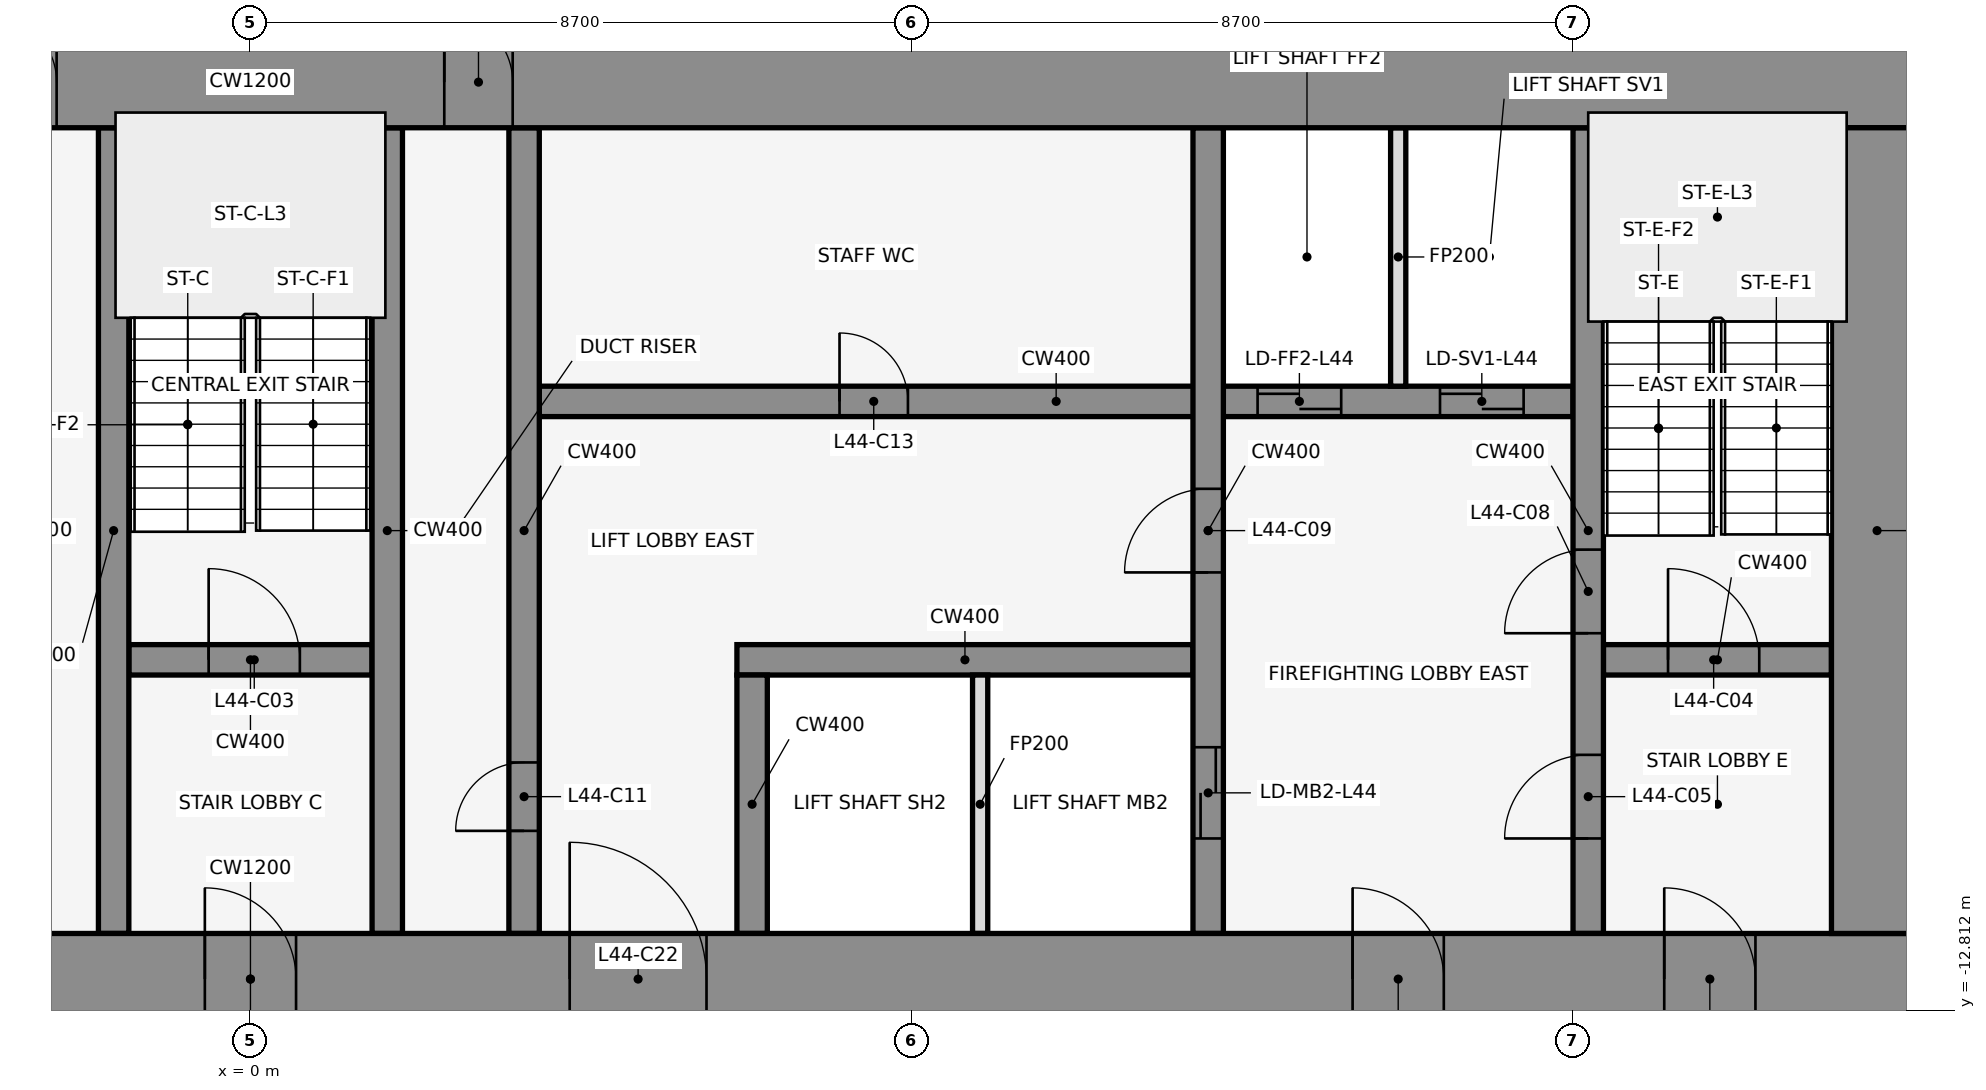
"""IFC4 building model, lengths in metres.
Left out: names, types, materials, properties, quantities, classifications, styles, units other than length and angle.
Written with IfcOpenShell. Run it as: python <this file> out.ifc"""

import sys

from ifc_helpers import new_model, si_unit, direction, frame, frame_2d, origin, place, context, subcontext, project, spatial, rectangle, extrude, element, fill, save


model = new_model("IFC4")
c1 = context("Model", 3, precision=1e-05, world=origin(), true_north=direction((0.0, 1.0)))
c2 = subcontext(c1, "Body", "Model", "MODEL_VIEW")
j1 = project(units=[si_unit("LENGTHUNIT", "METRE"), si_unit("PLANEANGLEUNIT", "RADIAN")], contexts=[c1])
p1 = place(None, origin())
s1 = spatial("IfcSite", under=j1, at=p1, CompositionType="ELEMENT")
p2 = place(p1, origin())
s2 = spatial("IfcBuilding", under=s1, at=p2, CompositionType="ELEMENT")
p3 = place(p2, frame((0.0, 0.0, 199.1)))
s3 = spatial("IfcBuildingStorey", under=s2, at=p3, CompositionType="ELEMENT", Elevation=199.1)
for number, where, z_axis, x_axis in (
    (1, (16.432, -0.105, 0.0), (0.0, 0.0, 1.0), (-0.84, 0.543, 0.0)),
    (2, (1.901, 1.08, 0.0), (0.0, 0.0, 1.0), (-0.84, -0.543, 0.0)),
    (3, (-0.068, -0.105, 0.0), (0.0, 0.0, 1.0), (-0.84, 0.543, 0.0)),
):
    element("IfcWall", number, at=place(p3, frame(where, z_axis=z_axis, x_axis=x_axis)), inside=s3, PredefinedType="STANDARD", context=c2, shape_type="SweptSolid", body=[
        extrude(rectangle(XDim=2.183, YDim=0.25, at=frame_2d((1.091, 0.0))), origin(), (0.0, 0.0, 1.0), 3.95),
    ])
p4 = place(p3, frame((-1.6, -8.2, 0.0), z_axis=(0.0, 0.0, 1.0), x_axis=(1.0, 0.0, 0.0)))
e4 = element("IfcWall", 4, at=p4, inside=s3, PredefinedType="SHEAR", context=c2, shape_type="SweptSolid", body=[
    extrude(rectangle(XDim=3.2, YDim=0.4, at=frame_2d((1.6, 0.0))), origin(), (0.0, 0.0, 1.0), 4.1),
])
p5 = place(p4, frame((1.05, 0.0, 0.0)))
e5 = element("IfcOpeningElement", 5, at=p5, cuts=e4, PredefinedType="OPENING", context=c2, shape_type="SweptSolid", body=[
    extrude(rectangle(XDim=1.2, YDim=2.1, at=frame_2d((0.6, 1.05))), frame((0.0, 0.212, 0.0), z_axis=(0.0, -1.0, 0.0), x_axis=(1.0, 0.0, 0.0)), (0.0, 0.0, 1.0), 0.424),
])
p6 = place(p3, frame((6.4, -8.2, 0.0), z_axis=(0.0, 0.0, 1.0), x_axis=(1.0, 0.0, 0.0)))
e6 = element("IfcWall", 6, at=p6, inside=s3, PredefinedType="SHEAR", context=c2, shape_type="SweptSolid", body=[
    extrude(rectangle(XDim=6.0, YDim=0.4, at=frame_2d((3.0, 0.0))), origin(), (0.0, 0.0, 1.0), 4.1),
])
p7 = place(p3, frame((17.8, -8.2, 0.0), z_axis=(0.0, 0.0, 1.0), x_axis=(1.0, 0.0, 0.0)))
e7 = element("IfcWall", 7, at=p7, inside=s3, PredefinedType="SHEAR", context=c2, shape_type="SweptSolid", body=[
    extrude(rectangle(XDim=3.0, YDim=0.4, at=frame_2d((1.5, 0.0))), origin(), (0.0, 0.0, 1.0), 4.1),
])
p8 = place(p7, frame((0.85, 0.0, 0.0)))
e8 = element("IfcOpeningElement", 8, at=p8, cuts=e7, PredefinedType="OPENING", context=c2, shape_type="SweptSolid", body=[
    extrude(rectangle(XDim=1.2, YDim=2.1, at=frame_2d((0.6, 1.05))), frame((0.0, 0.212, 0.0), z_axis=(0.0, -1.0, 0.0), x_axis=(1.0, 0.0, 0.0)), (0.0, 0.0, 1.0), 0.424),
])
p9 = place(p3, frame((3.8, -4.8, 0.0), z_axis=(0.0, 0.0, 1.0), x_axis=(1.0, 0.0, 0.0)))
e9 = element("IfcWall", 9, at=p9, inside=s3, PredefinedType="SHEAR", context=c2, shape_type="SweptSolid", body=[
    extrude(rectangle(XDim=13.6, YDim=0.4, at=frame_2d((6.8, 0.0))), origin(), (0.0, 0.0, 1.0), 4.1),
])
p10 = place(p9, frame((9.45, 0.0, 0.0)))
e10 = element("IfcOpeningElement", 10, at=p10, cuts=e9, PredefinedType="OPENING", context=c2, shape_type="SweptSolid", body=[
    extrude(rectangle(XDim=1.1, YDim=2.1, at=frame_2d((0.55, 1.05))), frame((0.0, 0.212, 0.0), z_axis=(0.0, -1.0, 0.0), x_axis=(1.0, 0.0, 0.0)), (0.0, 0.0, 1.0), 0.424),
])
p11 = place(p9, frame((11.85, 0.0, 0.0)))
e11 = element("IfcOpeningElement", 11, at=p11, cuts=e9, PredefinedType="OPENING", context=c2, shape_type="SweptSolid", body=[
    extrude(rectangle(XDim=1.1, YDim=2.1, at=frame_2d((0.55, 1.05))), frame((0.0, 0.212, 0.0), z_axis=(0.0, -1.0, 0.0), x_axis=(1.0, 0.0, 0.0)), (0.0, 0.0, 1.0), 0.424),
])
p12 = place(p9, frame((3.95, 0.0, 0.0)))
e12 = element("IfcOpeningElement", 12, at=p12, cuts=e9, PredefinedType="OPENING", context=c2, shape_type="SweptSolid", body=[
    extrude(rectangle(XDim=0.9, YDim=2.1, at=frame_2d((0.45, 1.05))), frame((0.0, 0.212, 0.0), z_axis=(0.0, -1.0, 0.0), x_axis=(1.0, 0.0, 0.0)), (0.0, 0.0, 1.0), 0.424),
])
for number, where, z_axis, x_axis in (
    (13, (-1.8, -11.8, 0.0), (0.0, 0.0, 1.0), (0.0, 1.0, 0.0)),
    (14, (1.8, -11.8, 0.0), (0.0, 0.0, 1.0), (0.0, 1.0, 0.0)),
):
    element("IfcWall", number, at=place(p3, frame(where, z_axis=z_axis, x_axis=x_axis)), inside=s3, PredefinedType="SHEAR", context=c2, shape_type="SweptSolid", body=[
        extrude(rectangle(XDim=10.6, YDim=0.4, at=frame_2d((5.3, 0.0))), origin(), (0.0, 0.0, 1.0), 4.1),
    ])
p13 = place(p3, frame((3.6, -11.8, 0.0), z_axis=(0.0, 0.0, 1.0), x_axis=(0.0, 1.0, 0.0)))
e15 = element("IfcWall", 15, at=p13, inside=s3, PredefinedType="SHEAR", context=c2, shape_type="SweptSolid", body=[
    extrude(rectangle(XDim=10.6, YDim=0.4, at=frame_2d((5.3, 0.0))), origin(), (0.0, 0.0, 1.0), 4.1),
])
p14 = place(p13, frame((1.35, 0.0, 0.0)))
e16 = element("IfcOpeningElement", 16, at=p14, cuts=e15, PredefinedType="OPENING", context=c2, shape_type="SweptSolid", body=[
    extrude(rectangle(XDim=0.9, YDim=2.1, at=frame_2d((0.45, 1.05))), frame((0.0, 0.212, 0.0), z_axis=(0.0, -1.0, 0.0), x_axis=(1.0, 0.0, 0.0)), (0.0, 0.0, 1.0), 0.424),
])
p15 = place(p3, frame((6.6, -11.8, 0.0), z_axis=(0.0, 0.0, 1.0), x_axis=(0.0, 1.0, 0.0)))
e17 = element("IfcWall", 17, at=p15, inside=s3, PredefinedType="SHEAR", context=c2, shape_type="SweptSolid", body=[
    extrude(rectangle(XDim=3.4, YDim=0.4, at=frame_2d((1.7, 0.0))), origin(), (0.0, 0.0, 1.0), 4.1),
])
p16 = place(p3, frame((9.6, -11.8, 0.0), z_axis=(0.0, 0.0, 1.0), x_axis=(0.0, 1.0, 0.0)))
e18 = element("IfcWall", 18, at=p16, inside=s3, PredefinedType="PARTITIONING", context=c2, shape_type="SweptSolid", body=[
    extrude(rectangle(XDim=3.4, YDim=0.2, at=frame_2d((1.7, 0.0))), origin(), (0.0, 0.0, 1.0), 2.84),
])
p17 = place(p3, frame((12.6, -11.8, 0.0), z_axis=(0.0, 0.0, 1.0), x_axis=(0.0, 1.0, 0.0)))
e19 = element("IfcWall", 19, at=p17, inside=s3, PredefinedType="SHEAR", context=c2, shape_type="SweptSolid", body=[
    extrude(rectangle(XDim=10.6, YDim=0.4, at=frame_2d((5.3, 0.0))), origin(), (0.0, 0.0, 1.0), 4.1),
])
p18 = place(p17, frame((1.25, 0.0, 0.0)))
e20 = element("IfcOpeningElement", 20, at=p18, cuts=e19, PredefinedType="OPENING", context=c2, shape_type="SweptSolid", body=[
    extrude(rectangle(XDim=1.2, YDim=2.1, at=frame_2d((0.6, 1.05))), frame((0.0, 0.212, 0.0), z_axis=(0.0, -1.0, 0.0), x_axis=(1.0, 0.0, 0.0)), (0.0, 0.0, 1.0), 0.424),
])
p19 = place(p17, frame((4.75, 0.0, 0.0)))
e21 = element("IfcOpeningElement", 21, at=p19, cuts=e19, PredefinedType="OPENING", context=c2, shape_type="SweptSolid", body=[
    extrude(rectangle(XDim=1.1, YDim=2.1, at=frame_2d((0.55, 1.05))), frame((0.0, 0.212, 0.0), z_axis=(0.0, -1.0, 0.0), x_axis=(1.0, 0.0, 0.0)), (0.0, 0.0, 1.0), 0.424),
])
p20 = place(p3, frame((15.1, -4.6, 0.0), z_axis=(0.0, 0.0, 1.0), x_axis=(0.0, 1.0, 0.0)))
e22 = element("IfcWall", 22, at=p20, inside=s3, PredefinedType="PARTITIONING", context=c2, shape_type="SweptSolid", body=[
    extrude(rectangle(XDim=3.4, YDim=0.2, at=frame_2d((1.7, 0.0))), origin(), (0.0, 0.0, 1.0), 2.84),
])
p21 = place(p3, frame((17.6, -11.8, 0.0), z_axis=(0.0, 0.0, 1.0), x_axis=(0.0, 1.0, 0.0)))
e23 = element("IfcWall", 23, at=p21, inside=s3, PredefinedType="SHEAR", context=c2, shape_type="SweptSolid", body=[
    extrude(rectangle(XDim=10.6, YDim=0.4, at=frame_2d((5.3, 0.0))), origin(), (0.0, 0.0, 1.0), 4.1),
])
p22 = place(p21, frame((1.25, 0.0, 0.0)))
e24 = element("IfcOpeningElement", 24, at=p22, cuts=e23, PredefinedType="OPENING", context=c2, shape_type="SweptSolid", body=[
    extrude(rectangle(XDim=1.1, YDim=2.1, at=frame_2d((0.55, 1.05))), frame((0.0, 0.212, 0.0), z_axis=(0.0, -1.0, 0.0), x_axis=(1.0, 0.0, 0.0)), (0.0, 0.0, 1.0), 0.424),
])
p23 = place(p21, frame((3.95, 0.0, 0.0)))
e25 = element("IfcOpeningElement", 25, at=p23, cuts=e23, PredefinedType="OPENING", context=c2, shape_type="SweptSolid", body=[
    extrude(rectangle(XDim=1.1, YDim=2.1, at=frame_2d((0.55, 1.05))), frame((0.0, 0.212, 0.0), z_axis=(0.0, -1.0, 0.0), x_axis=(1.0, 0.0, 0.0)), (0.0, 0.0, 1.0), 0.424),
])
p24 = place(p3, frame((-22.0, -0.6, 0.0), z_axis=(0.0, 0.0, 1.0), x_axis=(1.0, 0.0, 0.0)))
e26 = element("IfcWall", 26, at=p24, inside=s3, PredefinedType="SHEAR", context=c2, shape_type="SweptSolid", body=[
    extrude(rectangle(XDim=44.0, YDim=1.2, at=frame_2d((22.0, 0.0))), origin(), (0.0, 0.0, 1.0), 4.1),
])
p25 = place(p24, frame((18.55, 0.0, 0.0)))
e27 = element("IfcOpeningElement", 27, at=p25, cuts=e26, PredefinedType="OPENING", context=c2, shape_type="SweptSolid", body=[
    extrude(rectangle(XDim=0.9, YDim=2.1, at=frame_2d((0.45, 1.05))), frame((0.0, 0.612, 0.0), z_axis=(0.0, -1.0, 0.0), x_axis=(1.0, 0.0, 0.0)), (0.0, 0.0, 1.0), 1.224),
])
p26 = place(p24, frame((24.55, 0.0, 0.0)))
e28 = element("IfcOpeningElement", 28, at=p26, cuts=e26, PredefinedType="OPENING", context=c2, shape_type="SweptSolid", body=[
    extrude(rectangle(XDim=0.9, YDim=2.1, at=frame_2d((0.45, 1.05))), frame((0.0, 0.612, 0.0), z_axis=(0.0, -1.0, 0.0), x_axis=(1.0, 0.0, 0.0)), (0.0, 0.0, 1.0), 1.224),
])
p27 = place(p3, frame((-22.0, -12.4, 0.0), z_axis=(0.0, 0.0, 1.0), x_axis=(1.0, 0.0, 0.0)))
e29 = element("IfcWall", 29, at=p27, inside=s3, PredefinedType="SHEAR", context=c2, shape_type="SweptSolid", body=[
    extrude(rectangle(XDim=44.0, YDim=1.2, at=frame_2d((22.0, 0.0))), origin(), (0.0, 0.0, 1.0), 4.1),
])
p28 = place(p27, frame((2.2, 0.0, 0.0)))
e30 = element("IfcOpeningElement", 30, at=p28, cuts=e29, PredefinedType="OPENING", context=c2, shape_type="SweptSolid", body=[
    extrude(rectangle(XDim=1.2, YDim=2.1, at=frame_2d((0.6, 1.05))), frame((0.0, 0.612, 0.0), z_axis=(0.0, -1.0, 0.0), x_axis=(1.0, 0.0, 0.0)), (0.0, 0.0, 1.0), 1.224),
])
p29 = place(p27, frame((21.4, 0.0, 0.0)))
e31 = element("IfcOpeningElement", 31, at=p29, cuts=e29, PredefinedType="OPENING", context=c2, shape_type="SweptSolid", body=[
    extrude(rectangle(XDim=1.2, YDim=2.1, at=frame_2d((0.6, 1.05))), frame((0.0, 0.612, 0.0), z_axis=(0.0, -1.0, 0.0), x_axis=(1.0, 0.0, 0.0)), (0.0, 0.0, 1.0), 1.224),
])
p30 = place(p27, frame((40.6, 0.0, 0.0)))
e32 = element("IfcOpeningElement", 32, at=p30, cuts=e29, PredefinedType="OPENING", context=c2, shape_type="SweptSolid", body=[
    extrude(rectangle(XDim=1.2, YDim=2.1, at=frame_2d((0.6, 1.05))), frame((0.0, 0.612, 0.0), z_axis=(0.0, -1.0, 0.0), x_axis=(1.0, 0.0, 0.0)), (0.0, 0.0, 1.0), 1.224),
])
p31 = place(p27, frame((16.0, 0.0, 0.0)))
e33 = element("IfcOpeningElement", 33, at=p31, cuts=e29, PredefinedType="OPENING", context=c2, shape_type="SweptSolid", body=[
    extrude(rectangle(XDim=1.8, YDim=2.1, at=frame_2d((0.9, 1.05))), frame((0.0, 0.612, 0.0), z_axis=(0.0, -1.0, 0.0), x_axis=(1.0, 0.0, 0.0)), (0.0, 0.0, 1.0), 1.224),
])
p32 = place(p27, frame((6.3, 0.0, 0.0)))
e34 = element("IfcOpeningElement", 34, at=p32, cuts=e29, PredefinedType="OPENING", context=c2, shape_type="SweptSolid", body=[
    extrude(rectangle(XDim=1.2, YDim=2.1, at=frame_2d((0.6, 1.05))), frame((0.0, 0.612, 0.0), z_axis=(0.0, -1.0, 0.0), x_axis=(1.0, 0.0, 0.0)), (0.0, 0.0, 1.0), 1.224),
])
p33 = place(p27, frame((26.2, 0.0, 0.0)))
e35 = element("IfcOpeningElement", 35, at=p33, cuts=e29, PredefinedType="OPENING", context=c2, shape_type="SweptSolid", body=[
    extrude(rectangle(XDim=1.8, YDim=2.1, at=frame_2d((0.9, 1.05))), frame((0.0, 0.612, 0.0), z_axis=(0.0, -1.0, 0.0), x_axis=(1.0, 0.0, 0.0)), (0.0, 0.0, 1.0), 1.224),
])
p34 = place(p27, frame((36.5, 0.0, 0.0)))
e36 = element("IfcOpeningElement", 36, at=p34, cuts=e29, PredefinedType="OPENING", context=c2, shape_type="SweptSolid", body=[
    extrude(rectangle(XDim=1.2, YDim=2.1, at=frame_2d((0.6, 1.05))), frame((0.0, 0.612, 0.0), z_axis=(0.0, -1.0, 0.0), x_axis=(1.0, 0.0, 0.0)), (0.0, 0.0, 1.0), 1.224),
])
p35 = place(p3, frame((21.4, -11.8, 0.0), z_axis=(0.0, 0.0, 1.0), x_axis=(0.0, 1.0, 0.0)))
e37 = element("IfcWall", 37, at=p35, inside=s3, PredefinedType="SHEAR", context=c2, shape_type="SweptSolid", body=[
    extrude(rectangle(XDim=10.6, YDim=1.2, at=frame_2d((5.3, 0.0))), origin(), (0.0, 0.0, 1.0), 4.1),
])
p36 = place(p5, origin())
e38 = element("IfcDoor", 38, at=p36, inside=s3, OperationType="SINGLE_SWING_LEFT", PredefinedType="DOOR", context=c2, shape_type="SweptSolid", body=[
    extrude(rectangle(XDim=1.2, YDim=2.1, at=frame_2d((0.6, 1.05))), frame((0.0, 0.025, 0.0), z_axis=(0.0, -1.0, 0.0), x_axis=(1.0, 0.0, 0.0)), (0.0, 0.0, 1.0), 0.05),
])
fill(e5, e38)
p37 = place(p8, origin())
e39 = element("IfcDoor", 39, at=p37, inside=s3, OperationType="SINGLE_SWING_RIGHT", PredefinedType="DOOR", context=c2, shape_type="SweptSolid", body=[
    extrude(rectangle(XDim=1.2, YDim=2.1, at=frame_2d((0.6, 1.05))), frame((0.0, 0.025, 0.0), z_axis=(0.0, -1.0, 0.0), x_axis=(1.0, 0.0, 0.0)), (0.0, 0.0, 1.0), 0.05),
])
fill(e8, e39)
p38 = place(p22, origin())
e40 = element("IfcDoor", 40, at=p38, inside=s3, OperationType="SINGLE_SWING_LEFT", PredefinedType="DOOR", context=c2, shape_type="SweptSolid", body=[
    extrude(rectangle(XDim=1.1, YDim=2.1, at=frame_2d((0.55, 1.05))), frame((0.0, 0.025, 0.0), z_axis=(0.0, -1.0, 0.0), x_axis=(1.0, 0.0, 0.0)), (0.0, 0.0, 1.0), 0.05),
])
fill(e24, e40)
p39 = place(p18, origin())
e41 = element("IfcDoor", 41, at=p39, inside=s3, OperationType="DOUBLE_DOOR_SLIDING", PredefinedType="DOOR", context=c2, shape_type="SweptSolid", body=[
    extrude(rectangle(XDim=1.2, YDim=2.1, at=frame_2d((0.6, 1.05))), frame((0.0, 0.025, 0.0), z_axis=(0.0, -1.0, 0.0), x_axis=(1.0, 0.0, 0.0)), (0.0, 0.0, 1.0), 0.05),
])
fill(e20, e41)
p40 = place(p10, origin())
e42 = element("IfcDoor", 42, at=p40, inside=s3, OperationType="DOUBLE_DOOR_SLIDING", PredefinedType="DOOR", context=c2, shape_type="SweptSolid", body=[
    extrude(rectangle(XDim=1.1, YDim=2.1, at=frame_2d((0.55, 1.05))), frame((0.0, 0.025, 0.0), z_axis=(0.0, -1.0, 0.0), x_axis=(1.0, 0.0, 0.0)), (0.0, 0.0, 1.0), 0.05),
])
fill(e10, e42)
p41 = place(p11, origin())
e43 = element("IfcDoor", 43, at=p41, inside=s3, OperationType="DOUBLE_DOOR_SLIDING", PredefinedType="DOOR", context=c2, shape_type="SweptSolid", body=[
    extrude(rectangle(XDim=1.1, YDim=2.1, at=frame_2d((0.55, 1.05))), frame((0.0, 0.025, 0.0), z_axis=(0.0, -1.0, 0.0), x_axis=(1.0, 0.0, 0.0)), (0.0, 0.0, 1.0), 0.05),
])
fill(e11, e43)
p42 = place(p23, origin())
e44 = element("IfcDoor", 44, at=p42, inside=s3, OperationType="SINGLE_SWING_RIGHT", PredefinedType="DOOR", context=c2, shape_type="SweptSolid", body=[
    extrude(rectangle(XDim=1.1, YDim=2.1, at=frame_2d((0.55, 1.05))), frame((0.0, 0.025, 0.0), z_axis=(0.0, -1.0, 0.0), x_axis=(1.0, 0.0, 0.0)), (0.0, 0.0, 1.0), 0.05),
])
fill(e25, e44)
p43 = place(p19, frame((1.1, 0.0, 0.0), z_axis=(0.0, 0.0, 1.0), x_axis=(-1.0, 0.0, 0.0)))
e45 = element("IfcDoor", 45, at=p43, inside=s3, OperationType="SINGLE_SWING_RIGHT", PredefinedType="DOOR", context=c2, shape_type="SweptSolid", body=[
    extrude(rectangle(XDim=1.1, YDim=2.1, at=frame_2d((0.55, 1.05))), frame((0.0, 0.025, 0.0), z_axis=(0.0, -1.0, 0.0), x_axis=(1.0, 0.0, 0.0)), (0.0, 0.0, 1.0), 0.05),
])
fill(e21, e45)
p44 = place(p14, origin())
e46 = element("IfcDoor", 46, at=p44, inside=s3, OperationType="SINGLE_SWING_LEFT", PredefinedType="DOOR", context=c2, shape_type="SweptSolid", body=[
    extrude(rectangle(XDim=0.9, YDim=2.1, at=frame_2d((0.45, 1.05))), frame((0.0, 0.025, 0.0), z_axis=(0.0, -1.0, 0.0), x_axis=(1.0, 0.0, 0.0)), (0.0, 0.0, 1.0), 0.05),
])
fill(e16, e46)
p45 = place(p12, origin())
e47 = element("IfcDoor", 47, at=p45, inside=s3, OperationType="SINGLE_SWING_LEFT", PredefinedType="DOOR", context=c2, shape_type="SweptSolid", body=[
    extrude(rectangle(XDim=0.9, YDim=2.1, at=frame_2d((0.45, 1.05))), frame((0.0, 0.025, 0.0), z_axis=(0.0, -1.0, 0.0), x_axis=(1.0, 0.0, 0.0)), (0.0, 0.0, 1.0), 0.05),
])
fill(e12, e47)
p46 = place(p25, origin())
e48 = element("IfcDoor", 48, at=p46, inside=s3, OperationType="SINGLE_SWING_LEFT", PredefinedType="DOOR", context=c2, shape_type="SweptSolid", body=[
    extrude(rectangle(XDim=0.9, YDim=2.1, at=frame_2d((0.45, 1.05))), frame((0.0, 0.025, 0.0), z_axis=(0.0, -1.0, 0.0), x_axis=(1.0, 0.0, 0.0)), (0.0, 0.0, 1.0), 0.05),
])
fill(e27, e48)
p47 = place(p26, origin())
e49 = element("IfcDoor", 49, at=p47, inside=s3, OperationType="SINGLE_SWING_LEFT", PredefinedType="DOOR", context=c2, shape_type="SweptSolid", body=[
    extrude(rectangle(XDim=0.9, YDim=2.1, at=frame_2d((0.45, 1.05))), frame((0.0, 0.025, 0.0), z_axis=(0.0, -1.0, 0.0), x_axis=(1.0, 0.0, 0.0)), (0.0, 0.0, 1.0), 0.05),
])
fill(e28, e49)
p48 = place(p29, frame((1.2, 0.0, 0.0), z_axis=(0.0, 0.0, 1.0), x_axis=(-1.0, 0.0, 0.0)))
e50 = element("IfcDoor", 50, at=p48, inside=s3, OperationType="SINGLE_SWING_RIGHT", PredefinedType="DOOR", context=c2, shape_type="SweptSolid", body=[
    extrude(rectangle(XDim=1.2, YDim=2.1, at=frame_2d((0.6, 1.05))), frame((0.0, 0.025, 0.0), z_axis=(0.0, -1.0, 0.0), x_axis=(1.0, 0.0, 0.0)), (0.0, 0.0, 1.0), 0.05),
])
fill(e31, e50)
p49 = place(p30, frame((1.2, 0.0, 0.0), z_axis=(0.0, 0.0, 1.0), x_axis=(-1.0, 0.0, 0.0)))
e51 = element("IfcDoor", 51, at=p49, inside=s3, OperationType="SINGLE_SWING_RIGHT", PredefinedType="DOOR", context=c2, shape_type="SweptSolid", body=[
    extrude(rectangle(XDim=1.2, YDim=2.1, at=frame_2d((0.6, 1.05))), frame((0.0, 0.025, 0.0), z_axis=(0.0, -1.0, 0.0), x_axis=(1.0, 0.0, 0.0)), (0.0, 0.0, 1.0), 0.05),
])
fill(e32, e51)
p50 = place(p33, origin())
e52 = element("IfcDoor", 52, at=p50, inside=s3, OperationType="SINGLE_SWING_LEFT", PredefinedType="DOOR", context=c2, shape_type="SweptSolid", body=[
    extrude(rectangle(XDim=1.8, YDim=2.1, at=frame_2d((0.9, 1.05))), frame((0.0, 0.025, 0.0), z_axis=(0.0, -1.0, 0.0), x_axis=(1.0, 0.0, 0.0)), (0.0, 0.0, 1.0), 0.05),
])
fill(e35, e52)
p51 = place(p34, frame((1.2, 0.0, 0.0), z_axis=(0.0, 0.0, 1.0), x_axis=(-1.0, 0.0, 0.0)))
e53 = element("IfcDoor", 53, at=p51, inside=s3, OperationType="SINGLE_SWING_RIGHT", PredefinedType="DOOR", context=c2, shape_type="SweptSolid", body=[
    extrude(rectangle(XDim=1.2, YDim=2.1, at=frame_2d((0.6, 1.05))), frame((0.0, 0.025, 0.0), z_axis=(0.0, -1.0, 0.0), x_axis=(1.0, 0.0, 0.0)), (0.0, 0.0, 1.0), 0.05),
])
fill(e36, e53)
save(model, sys.argv[1])
